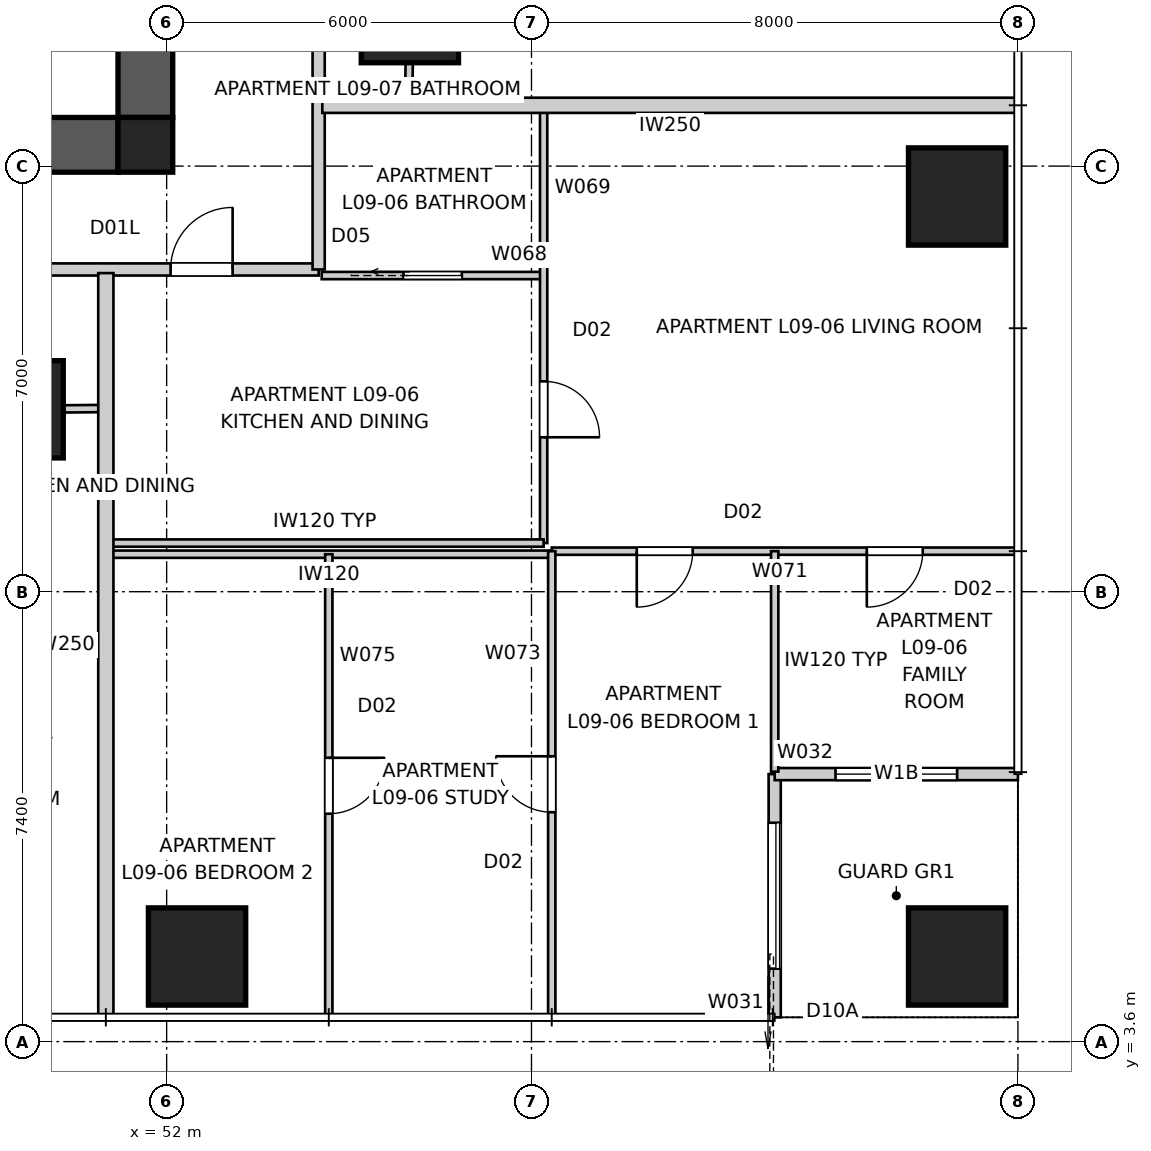
"""IFC4 building model, lengths in metres.
Left out: names, types, materials, properties, quantities, classifications, styles, units other than length and angle.
Written with IfcOpenShell. Run it as: python <this file> out.ifc"""

import sys

from ifc_helpers import new_model, si_unit, direction, frame, frame_2d, origin, origin_2d, place, context, subcontext, project, spatial, polyline, rectangle, outline, extrude, element, fill, save


model = new_model("IFC4")
c1 = context("Model", 3, precision=1e-05, world=origin(), true_north=direction((0.0, 1.0)))
c2 = subcontext(c1, "Body", "Model", "MODEL_VIEW")
j1 = project(units=[si_unit("LENGTHUNIT", "METRE"), si_unit("PLANEANGLEUNIT", "RADIAN")], contexts=[c1])
p1 = place(None, origin())
s1 = spatial("IfcSite", under=j1, at=p1, CompositionType="ELEMENT")
p2 = place(p1, origin())
s2 = spatial("IfcBuilding", under=s1, at=p2, CompositionType="ELEMENT")
p3 = place(p2, frame((0.0, 0.0, 35.4)))
s3 = spatial("IfcBuildingStorey", under=s2, at=p3, CompositionType="ELEMENT", Elevation=35.4)
p4 = place(p3, frame((51.2, 18.35, 0.0), z_axis=(0.0, 0.0, 1.0), x_axis=(-1.0, 0.0, 0.0)))
e1 = element("IfcWall", 1, at=p4, inside=s3, PredefinedType="SHEAR", context=c2, shape_type="SweptSolid", body=[
    extrude(outline(polyline([(0.0, -0.45), (22.4, -0.45), (22.4, -0.025), (22.85, -0.025), (22.85, 0.025), (22.4, 0.025), (22.4, 0.45), (0.0, 0.45), (0.0, 0.025), (-0.45, 0.025), (-0.45, -0.025), (0.0, -0.025), (0.0, -0.45)])), origin(), (0.0, 0.0, 1.0), 3.4),
])
p5 = place(p3, frame((51.65, 18.8, 0.0), z_axis=(0.0, 0.0, 1.0), x_axis=(0.0, 1.0, 0.0)))
e2 = element("IfcWall", 2, at=p5, inside=s3, PredefinedType="SHEAR", context=c2, shape_type="SweptSolid", body=[
    extrude(outline(polyline([(0.0, -0.45), (22.4, -0.45), (22.4, -0.025), (22.85, -0.025), (22.85, 0.025), (22.4, 0.025), (22.4, 0.45), (0.0, 0.45), (0.0, 0.025), (-0.45, 0.025), (-0.45, -0.025), (0.0, -0.025), (0.0, -0.45)])), origin(), (0.0, 0.0, 1.0), 3.4),
])
p6 = place(p5, frame((11.14, 0.0, 0.0)))
e3 = element("IfcOpeningElement", 3, at=p6, cuts=e2, PredefinedType="OPENING", context=c2, shape_type="SweptSolid", body=[
    extrude(rectangle(XDim=1.02, YDim=2.4, at=frame_2d((0.51, 1.2))), frame((0.0, 0.46, 0.0), z_axis=(0.0, -1.0, 0.0), x_axis=(1.0, 0.0, 0.0)), (0.0, 0.0, 1.0), 0.92),
])
p7 = place(p3, frame((51.65, 18.35, 0.0), z_axis=(0.0, 0.0, 1.0), x_axis=(1.0, 0.0, 0.0)))
e4 = element("IfcColumn", 4, at=p7, inside=s3, PredefinedType="COLUMN", context=c2, shape_type="SweptSolid", body=[
    extrude(rectangle(XDim=0.9, YDim=0.9, at=origin_2d()), origin(), (0.0, 0.0, 1.0), 3.4),
])
for number, where, z_axis, x_axis in (
    (5, (52.5, 5.0, 0.0), (0.0, 0.0, 1.0), (1.0, 0.0, 0.0)),
    (6, (65.0, 5.0, 0.0), (0.0, 0.0, 1.0), (1.0, 0.0, 0.0)),
    (7, (65.0, 17.5, 0.0), (0.0, 0.0, 1.0), (1.0, 0.0, 0.0)),
    (8, (49.5, 14.0, 0.0), (0.0, 0.0, 1.0), (1.0, 0.0, 0.0)),
    (9, (56.0, 20.5, 0.0), (0.0, 0.0, 1.0), (1.0, 0.0, 0.0)),
):
    element("IfcColumn", number, at=place(p3, frame(where, z_axis=z_axis, x_axis=x_axis)), inside=s3, PredefinedType="COLUMN", context=c2, shape_type="SweptSolid", body=[
        extrude(rectangle(XDim=1.6, YDim=1.6, at=origin_2d()), origin(), (0.0, 0.0, 1.0), 3.4),
    ])
p8 = place(p3, frame((62.0, 4.0, 0.0), z_axis=(0.0, 0.0, 1.0), x_axis=(0.0, 1.0, 0.0)))
e10 = element("IfcWall", 10, at=p8, inside=s3, PredefinedType="SOLIDWALL", context=c2, shape_type="SweptSolid", body=[
    extrude(rectangle(XDim=4.0, YDim=0.2, at=frame_2d((2.0, 0.0))), origin(), (0.0, 0.0, 1.0), 3.25),
])
p9 = place(p8, frame((0.8, 0.0, 0.0)))
e11 = element("IfcOpeningElement", 11, at=p9, cuts=e10, PredefinedType="OPENING", context=c2, shape_type="SweptSolid", body=[
    extrude(rectangle(XDim=2.4, YDim=2.1, at=frame_2d((1.2, 1.05))), frame((0.0, 0.11, 0.0), z_axis=(0.0, -1.0, 0.0), x_axis=(1.0, 0.0, 0.0)), (0.0, 0.0, 1.0), 0.22),
])
p10 = place(p3, frame((62.0, 8.0, 0.0), z_axis=(0.0, 0.0, 1.0), x_axis=(1.0, 0.0, 0.0)))
e12 = element("IfcWall", 12, at=p10, inside=s3, PredefinedType="SOLIDWALL", context=c2, shape_type="SweptSolid", body=[
    extrude(rectangle(XDim=4.0, YDim=0.2, at=frame_2d((2.0, 0.0))), origin(), (0.0, 0.0, 1.0), 3.25),
])
p11 = place(p10, frame((1.0, 0.0, 0.45)))
e13 = element("IfcOpeningElement", 13, at=p11, cuts=e12, PredefinedType="OPENING", context=c2, shape_type="SweptSolid", body=[
    extrude(rectangle(XDim=2.0, YDim=1.8, at=frame_2d((1.0, 0.9))), frame((0.0, 0.11, 0.0), z_axis=(0.0, -1.0, 0.0), x_axis=(1.0, 0.0, 0.0)), (0.0, 0.0, 1.0), 0.22),
])
p12 = place(p3, frame((26.3, 16.3, 0.0), z_axis=(0.0, 0.0, 1.0), x_axis=(1.0, 0.0, 0.0)))
e14 = element("IfcWall", 14, at=p12, inside=s3, PredefinedType="PARTITIONING", context=c2, shape_type="SweptSolid", body=[
    extrude(rectangle(XDim=28.2, YDim=0.2, at=frame_2d((14.1, 0.0))), origin(), (0.0, 0.0, 1.0), 3.25),
])
p13 = place(p12, frame((4.738, 0.0, 0.0)))
e15 = element("IfcOpeningElement", 15, at=p13, cuts=e14, PredefinedType="OPENING", context=c2, shape_type="SweptSolid", body=[
    extrude(rectangle(XDim=1.02, YDim=2.34, at=frame_2d((0.51, 1.17))), frame((0.0, 0.11, 0.0), z_axis=(0.0, -1.0, 0.0), x_axis=(1.0, 0.0, 0.0)), (0.0, 0.0, 1.0), 0.22),
])
p14 = place(p12, frame((14.525, 0.0, 0.0)))
e16 = element("IfcOpeningElement", 16, at=p14, cuts=e14, PredefinedType="OPENING", context=c2, shape_type="SweptSolid", body=[
    extrude(rectangle(XDim=1.02, YDim=2.34, at=frame_2d((0.51, 1.17))), frame((0.0, 0.11, 0.0), z_axis=(0.0, -1.0, 0.0), x_axis=(1.0, 0.0, 0.0)), (0.0, 0.0, 1.0), 0.22),
])
p15 = place(p12, frame((22.333, 0.0, 0.0)))
e17 = element("IfcOpeningElement", 17, at=p15, cuts=e14, PredefinedType="OPENING", context=c2, shape_type="SweptSolid", body=[
    extrude(rectangle(XDim=1.02, YDim=2.34, at=frame_2d((0.51, 1.17))), frame((0.0, 0.11, 0.0), z_axis=(0.0, -1.0, 0.0), x_axis=(1.0, 0.0, 0.0)), (0.0, 0.0, 1.0), 0.22),
])
p16 = place(p12, frame((25.765, 0.0, 0.0)))
e18 = element("IfcOpeningElement", 18, at=p16, cuts=e14, PredefinedType="OPENING", context=c2, shape_type="SweptSolid", body=[
    extrude(rectangle(XDim=1.02, YDim=2.1, at=frame_2d((0.51, 1.05))), frame((0.0, 0.11, 0.0), z_axis=(0.0, -1.0, 0.0), x_axis=(1.0, 0.0, 0.0)), (0.0, 0.0, 1.0), 0.22),
])
p17 = place(p12, frame((1.015, 0.0, 0.0)))
e19 = element("IfcOpeningElement", 19, at=p17, cuts=e14, PredefinedType="OPENING", context=c2, shape_type="SweptSolid", body=[
    extrude(rectangle(XDim=1.02, YDim=2.1, at=frame_2d((0.51, 1.05))), frame((0.0, 0.11, 0.0), z_axis=(0.0, -1.0, 0.0), x_axis=(1.0, 0.0, 0.0)), (0.0, 0.0, 1.0), 0.22),
])
p18 = place(p3, frame((54.5, 16.3, 0.0), z_axis=(0.0, 0.0, 1.0), x_axis=(0.0, 1.0, 0.0)))
e20 = element("IfcWall", 20, at=p18, inside=s3, PredefinedType="PARTITIONING", context=c2, shape_type="SweptSolid", body=[
    extrude(rectangle(XDim=28.2, YDim=0.2, at=frame_2d((14.1, 0.0))), origin(), (0.0, 0.0, 1.0), 3.25),
])
p19 = place(p18, frame((8.403, 0.0, 0.0)))
e21 = element("IfcOpeningElement", 21, at=p19, cuts=e20, PredefinedType="OPENING", context=c2, shape_type="SweptSolid", body=[
    extrude(rectangle(XDim=1.02, YDim=2.34, at=frame_2d((0.51, 1.17))), frame((0.0, 0.11, 0.0), z_axis=(0.0, -1.0, 0.0), x_axis=(1.0, 0.0, 0.0)), (0.0, 0.0, 1.0), 0.22),
])
p20 = place(p18, frame((15.16, 0.0, 0.0)))
e22 = element("IfcOpeningElement", 22, at=p20, cuts=e20, PredefinedType="OPENING", context=c2, shape_type="SweptSolid", body=[
    extrude(rectangle(XDim=1.02, YDim=2.34, at=frame_2d((0.51, 1.17))), frame((0.0, 0.11, 0.0), z_axis=(0.0, -1.0, 0.0), x_axis=(1.0, 0.0, 0.0)), (0.0, 0.0, 1.0), 0.22),
])
p21 = place(p3, frame((51.0, 4.0, 0.0), z_axis=(0.0, 0.0, 1.0), x_axis=(0.0, 1.0, 0.0)))
e23 = element("IfcWall", 23, at=p21, inside=s3, PredefinedType="PARTITIONING", context=c2, shape_type="SweptSolid", body=[
    extrude(rectangle(XDim=12.24, YDim=0.25, at=frame_2d((6.12, 0.0))), origin(), (0.0, 0.0, 1.0), 3.25),
])
p22 = place(p3, frame((66.0, 19.0, 0.0), z_axis=(0.0, 0.0, 1.0), x_axis=(-1.0, 0.0, 0.0)))
e24 = element("IfcWall", 24, at=p22, inside=s3, PredefinedType="PARTITIONING", context=c2, shape_type="SweptSolid", body=[
    extrude(rectangle(XDim=11.44, YDim=0.25, at=frame_2d((5.72, 0.0))), origin(), (0.0, 0.0, 1.0), 3.25),
])
p23 = place(p3, frame((51.0, 14.013, 0.0), z_axis=(0.0, 0.0, 1.0), x_axis=(-0.999961771263, -0.008743912924, 0.0)))
e25 = element("IfcWall", 25, at=p23, inside=s3, PredefinedType="PARTITIONING", context=c2, shape_type="SweptSolid", body=[
    extrude(rectangle(XDim=3.714, YDim=0.12, at=frame_2d((1.857, 0.0))), origin(), (0.0, 0.0, 1.0), 2.549),
])
p24 = place(p23, frame((2.447, 0.0, 0.0)))
e26 = element("IfcOpeningElement", 26, at=p24, cuts=e25, PredefinedType="OPENING", context=c2, shape_type="SweptSolid", body=[
    extrude(rectangle(XDim=0.92, YDim=2.34, at=frame_2d((0.46, 1.17))), frame((0.0, 0.07, 0.0), z_axis=(0.0, -1.0, 0.0), x_axis=(1.0, 0.0, 0.0)), (0.0, 0.0, 1.0), 0.14),
])
p25 = place(p3, frame((54.55, 16.2, 0.0), z_axis=(0.0, 0.0, 1.0), x_axis=(1.0, 0.0, 0.0)))
e27 = element("IfcWall", 27, at=p25, inside=s3, PredefinedType="PARTITIONING", context=c2, shape_type="SweptSolid", body=[
    extrude(rectangle(XDim=3.65, YDim=0.12, at=frame_2d((1.825, 0.0))), origin(), (0.0, 0.0, 1.0), 3.25),
])
p26 = place(p25, frame((1.345, 0.0, 0.0)))
e28 = element("IfcOpeningElement", 28, at=p26, cuts=e27, PredefinedType="OPENING", context=c2, shape_type="SweptSolid", body=[
    extrude(rectangle(XDim=0.96, YDim=2.1, at=frame_2d((0.48, 1.05))), frame((0.0, 0.07, 0.0), z_axis=(0.0, -1.0, 0.0), x_axis=(1.0, 0.0, 0.0)), (0.0, 0.0, 1.0), 0.14),
])
p27 = place(p3, frame((58.2, 19.0, 0.0), z_axis=(0.0, 0.0, 1.0), x_axis=(0.0, -1.0, 0.0)))
e29 = element("IfcWall", 29, at=p27, inside=s3, PredefinedType="PARTITIONING", context=c2, shape_type="SweptSolid", body=[
    extrude(rectangle(XDim=7.2, YDim=0.12, at=frame_2d((3.6, 0.0))), origin(), (0.0, 0.0, 1.0), 3.25),
])
p28 = place(p27, frame((4.54, 0.0, 0.0)))
e30 = element("IfcOpeningElement", 30, at=p28, cuts=e29, PredefinedType="OPENING", context=c2, shape_type="SweptSolid", body=[
    extrude(rectangle(XDim=0.92, YDim=2.34, at=frame_2d((0.46, 1.17))), frame((0.0, 0.07, 0.0), z_axis=(0.0, -1.0, 0.0), x_axis=(1.0, 0.0, 0.0)), (0.0, 0.0, 1.0), 0.14),
])
p29 = place(p3, frame((58.2, 11.8, 0.0), z_axis=(0.0, 0.0, 1.0), x_axis=(-1.0, 0.0, 0.0)))
e31 = element("IfcWall", 31, at=p29, inside=s3, PredefinedType="PARTITIONING", context=c2, shape_type="SweptSolid", body=[
    extrude(rectangle(XDim=7.2, YDim=0.12, at=frame_2d((3.6, 0.0))), origin(), (0.0, 0.0, 1.0), 3.25),
])
p30 = place(p3, frame((65.96, 11.667, 0.0), z_axis=(0.0, 0.0, 1.0), x_axis=(-1.0, 0.0, 0.0)))
e32 = element("IfcWall", 32, at=p30, inside=s3, PredefinedType="PARTITIONING", context=c2, shape_type="SweptSolid", body=[
    extrude(rectangle(XDim=7.627, YDim=0.12, at=frame_2d((3.813, 0.0))), origin(), (0.0, 0.0, 1.0), 3.25),
])
p31 = place(p30, frame((1.525, 0.0, 0.0)))
e33 = element("IfcOpeningElement", 33, at=p31, cuts=e32, PredefinedType="OPENING", context=c2, shape_type="SweptSolid", body=[
    extrude(rectangle(XDim=0.92, YDim=2.34, at=frame_2d((0.46, 1.17))), frame((0.0, 0.07, 0.0), z_axis=(0.0, -1.0, 0.0), x_axis=(1.0, 0.0, 0.0)), (0.0, 0.0, 1.0), 0.14),
])
p32 = place(p30, frame((5.308, 0.0, 0.0)))
e34 = element("IfcOpeningElement", 34, at=p32, cuts=e32, PredefinedType="OPENING", context=c2, shape_type="SweptSolid", body=[
    extrude(rectangle(XDim=0.92, YDim=2.34, at=frame_2d((0.46, 1.17))), frame((0.0, 0.07, 0.0), z_axis=(0.0, -1.0, 0.0), x_axis=(1.0, 0.0, 0.0)), (0.0, 0.0, 1.0), 0.14),
])
p33 = place(p3, frame((58.333, 11.617, 0.0), z_axis=(0.0, 0.0, 1.0), x_axis=(-1.0, 0.0, 0.0)))
e35 = element("IfcWall", 35, at=p33, inside=s3, PredefinedType="PARTITIONING", context=c2, shape_type="SweptSolid", body=[
    extrude(rectangle(XDim=7.333, YDim=0.12, at=frame_2d((3.667, 0.0))), origin(), (0.0, 0.0, 1.0), 3.25),
])
p34 = place(p3, frame((58.333, 4.04, 0.0), z_axis=(0.0, 0.0, 1.0), x_axis=(0.0, 1.0, 0.0)))
e36 = element("IfcWall", 36, at=p34, inside=s3, PredefinedType="PARTITIONING", context=c2, shape_type="SweptSolid", body=[
    extrude(rectangle(XDim=7.627, YDim=0.12, at=frame_2d((3.813, 0.0))), origin(), (0.0, 0.0, 1.0), 3.25),
])
p35 = place(p34, frame((3.333, 0.0, 0.0)))
e37 = element("IfcOpeningElement", 37, at=p35, cuts=e36, PredefinedType="OPENING", context=c2, shape_type="SweptSolid", body=[
    extrude(rectangle(XDim=0.92, YDim=2.34, at=frame_2d((0.46, 1.17))), frame((0.0, 0.07, 0.0), z_axis=(0.0, -1.0, 0.0), x_axis=(1.0, 0.0, 0.0)), (0.0, 0.0, 1.0), 0.14),
])
p36 = place(p3, frame((62.0, 11.667, 0.0), z_axis=(0.0, 0.0, 1.0), x_axis=(0.0, -1.0, 0.0)))
e38 = element("IfcWall", 38, at=p36, inside=s3, PredefinedType="PARTITIONING", context=c2, shape_type="SweptSolid", body=[
    extrude(rectangle(XDim=3.627, YDim=0.12, at=frame_2d((1.813, 0.0))), origin(), (0.0, 0.0, 1.0), 3.25),
])
p37 = place(p3, frame((54.667, 11.617, 0.0), z_axis=(0.0, 0.0, 1.0), x_axis=(0.0, -1.0, 0.0)))
e39 = element("IfcWall", 39, at=p37, inside=s3, PredefinedType="PARTITIONING", context=c2, shape_type="SweptSolid", body=[
    extrude(rectangle(XDim=7.577, YDim=0.12, at=frame_2d((3.788, 0.0))), origin(), (0.0, 0.0, 1.0), 2.638),
])
p38 = place(p37, frame((3.348, 0.0, 0.0)))
e40 = element("IfcOpeningElement", 40, at=p38, cuts=e39, PredefinedType="OPENING", context=c2, shape_type="SweptSolid", body=[
    extrude(rectangle(XDim=0.92, YDim=2.34, at=frame_2d((0.46, 1.17))), frame((0.0, 0.07, 0.0), z_axis=(0.0, -1.0, 0.0), x_axis=(1.0, 0.0, 0.0)), (0.0, 0.0, 1.0), 0.14),
])
p39 = place(p3, frame((56.035, 23.118, 0.0), z_axis=(0.0, 0.0, 1.0), x_axis=(-0.013455418228, -0.999909471762, 0.0)))
e41 = element("IfcWall", 41, at=p39, inside=s3, PredefinedType="PARTITIONING", context=c2, shape_type="SweptSolid", body=[
    extrude(rectangle(XDim=4.119, YDim=0.12, at=frame_2d((2.06, 0.0))), origin(), (0.0, 0.0, 1.0), 2.549),
])
p40 = place(p9, origin())
e42 = element("IfcDoor", 42, at=p40, inside=s3, OperationType="SLIDING_TO_LEFT", PredefinedType="DOOR", context=c2, shape_type="SweptSolid", body=[
    extrude(rectangle(XDim=2.4, YDim=2.1, at=frame_2d((1.2, 1.05))), frame((0.0, 0.025, 0.0), z_axis=(0.0, -1.0, 0.0), x_axis=(1.0, 0.0, 0.0)), (0.0, 0.0, 1.0), 0.05),
])
fill(e11, e42)
p41 = place(p11, origin())
e43 = element("IfcWindow", 43, at=p41, inside=s3, PartitioningType="SINGLE_PANEL", PredefinedType="WINDOW", context=c2, shape_type="SweptSolid", body=[
    extrude(rectangle(XDim=2.0, YDim=1.8, at=frame_2d((1.0, 0.9))), frame((0.0, 0.03, 0.0), z_axis=(0.0, -1.0, 0.0), x_axis=(1.0, 0.0, 0.0)), (0.0, 0.0, 1.0), 0.06),
])
fill(e13, e43)
p42 = place(p16, origin())
e44 = element("IfcDoor", 44, at=p42, inside=s3, OperationType="SINGLE_SWING_RIGHT", PredefinedType="DOOR", context=c2, shape_type="SweptSolid", body=[
    extrude(rectangle(XDim=1.02, YDim=2.1, at=frame_2d((0.51, 1.05))), frame((0.0, 0.025, 0.0), z_axis=(0.0, -1.0, 0.0), x_axis=(1.0, 0.0, 0.0)), (0.0, 0.0, 1.0), 0.05),
])
fill(e18, e44)
p43 = place(p28, origin())
e45 = element("IfcDoor", 45, at=p43, inside=s3, OperationType="SINGLE_SWING_RIGHT", PredefinedType="DOOR", context=c2, shape_type="SweptSolid", body=[
    extrude(rectangle(XDim=0.92, YDim=2.34, at=frame_2d((0.46, 1.17))), frame((0.0, 0.025, 0.0), z_axis=(0.0, -1.0, 0.0), x_axis=(1.0, 0.0, 0.0)), (0.0, 0.0, 1.0), 0.05),
])
fill(e30, e45)
p44 = place(p26, origin())
e46 = element("IfcDoor", 46, at=p44, inside=s3, OperationType="SLIDING_TO_LEFT", PredefinedType="DOOR", context=c2, shape_type="SweptSolid", body=[
    extrude(rectangle(XDim=0.96, YDim=2.1, at=frame_2d((0.48, 1.05))), frame((0.0, 0.025, 0.0), z_axis=(0.0, -1.0, 0.0), x_axis=(1.0, 0.0, 0.0)), (0.0, 0.0, 1.0), 0.05),
])
fill(e28, e46)
p45 = place(p31, origin())
e47 = element("IfcDoor", 47, at=p45, inside=s3, OperationType="SINGLE_SWING_RIGHT", PredefinedType="DOOR", context=c2, shape_type="SweptSolid", body=[
    extrude(rectangle(XDim=0.92, YDim=2.34, at=frame_2d((0.46, 1.17))), frame((0.0, 0.025, 0.0), z_axis=(0.0, -1.0, 0.0), x_axis=(1.0, 0.0, 0.0)), (0.0, 0.0, 1.0), 0.05),
])
fill(e33, e47)
p46 = place(p32, origin())
e48 = element("IfcDoor", 48, at=p46, inside=s3, OperationType="SINGLE_SWING_RIGHT", PredefinedType="DOOR", context=c2, shape_type="SweptSolid", body=[
    extrude(rectangle(XDim=0.92, YDim=2.34, at=frame_2d((0.46, 1.17))), frame((0.0, 0.025, 0.0), z_axis=(0.0, -1.0, 0.0), x_axis=(1.0, 0.0, 0.0)), (0.0, 0.0, 1.0), 0.05),
])
fill(e34, e48)
p47 = place(p35, origin())
e49 = element("IfcDoor", 49, at=p47, inside=s3, OperationType="SINGLE_SWING_RIGHT", PredefinedType="DOOR", context=c2, shape_type="SweptSolid", body=[
    extrude(rectangle(XDim=0.92, YDim=2.34, at=frame_2d((0.46, 1.17))), frame((0.0, 0.025, 0.0), z_axis=(0.0, -1.0, 0.0), x_axis=(1.0, 0.0, 0.0)), (0.0, 0.0, 1.0), 0.05),
])
fill(e37, e49)
p48 = place(p38, origin())
e50 = element("IfcDoor", 50, at=p48, inside=s3, OperationType="SINGLE_SWING_LEFT", PredefinedType="DOOR", context=c2, shape_type="SweptSolid", body=[
    extrude(rectangle(XDim=0.92, YDim=2.34, at=frame_2d((0.46, 1.17))), frame((0.0, 0.025, 0.0), z_axis=(0.0, -1.0, 0.0), x_axis=(1.0, 0.0, 0.0)), (0.0, 0.0, 1.0), 0.05),
])
fill(e40, e50)
save(model, sys.argv[1])
